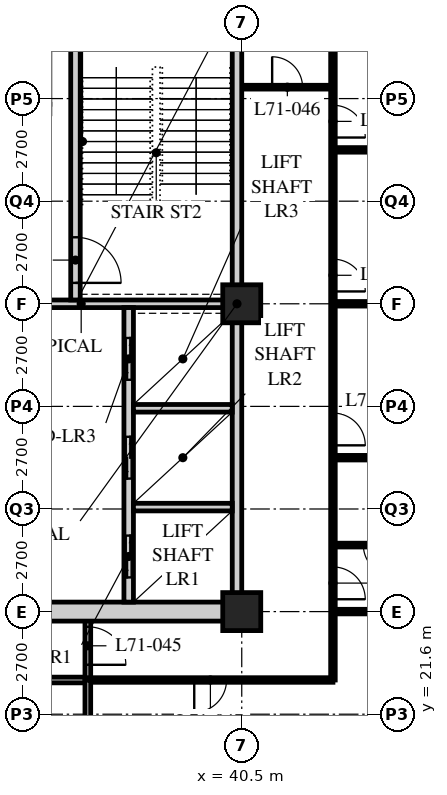
"""IFC4 building model, lengths in metres.
Left out: names, types, materials, properties, quantities, classifications, styles, units other than length and angle.
Written with IfcOpenShell. Run it as: python <this file> out.ifc"""

import sys

from ifc_helpers import new_model, si_unit, direction, frame, frame_2d, origin, origin_2d, place, context, subcontext, project, spatial, rectangle, hollow_rectangle, extrude, element, fill, save


model = new_model("IFC4")
c1 = context("Model", 3, precision=1e-05, world=origin(), true_north=direction((0.0, 1.0)))
c2 = subcontext(c1, "Body", "Model", "MODEL_VIEW")
j1 = project(units=[si_unit("LENGTHUNIT", "METRE"), si_unit("PLANEANGLEUNIT", "RADIAN")], contexts=[c1])
p1 = place(None, origin())
s1 = spatial("IfcSite", under=j1, at=p1, CompositionType="ELEMENT")
p2 = place(p1, origin())
s2 = spatial("IfcBuilding", under=s1, at=p2, CompositionType="ELEMENT")
p3 = place(p2, frame((0.0, 0.0, 277.5)))
s3 = spatial("IfcBuildingStorey", under=s2, at=p3, CompositionType="ELEMENT", Elevation=277.5)
for number, where, z_axis, x_axis in (
    (1, (40.5, 24.3, 0.0), (0.0, 0.0, 1.0), (1.0, 0.0, 0.0)),
    (2, (40.5, 32.4, 0.0), (0.0, 0.0, 1.0), (1.0, 0.0, 0.0)),
):
    element("IfcColumn", number, at=place(p3, frame(where, z_axis=z_axis, x_axis=x_axis)), inside=s3, PredefinedType="COLUMN", context=c2, shape_type="SweptSolid", body=[
        extrude(hollow_rectangle(XDim=1.0, YDim=1.0, WallThickness=0.1, at=origin_2d()), origin(), (0.0, 0.0, 1.0), 3.9),
    ])
p4 = place(p3, frame((12.15, 22.5, 0.0), z_axis=(0.0, 0.0, 1.0), x_axis=(1.0, 0.0, 0.0)))
e3 = element("IfcWall", 3, at=p4, inside=s3, PredefinedType="PARTITIONING", context=c2, shape_type="SweptSolid", body=[
    extrude(rectangle(XDim=24.3, YDim=0.15, at=frame_2d((12.15, 0.0))), origin(), (0.0, 0.0, 1.0), 3.69),
])
p5 = place(p4, frame((4.45, 0.0, 0.0)))
e4 = element("IfcOpeningElement", 4, at=p5, cuts=e3, PredefinedType="OPENING", context=c2, shape_type="SweptSolid", body=[
    extrude(rectangle(XDim=1.0, YDim=2.1, at=frame_2d((0.5, 1.05))), frame((0.0, 0.085, 0.0), z_axis=(0.0, -1.0, 0.0), x_axis=(1.0, 0.0, 0.0)), (0.0, 0.0, 1.0), 0.17),
])
p6 = place(p4, frame((12.55, 0.0, 0.0)))
e5 = element("IfcOpeningElement", 5, at=p6, cuts=e3, PredefinedType="OPENING", context=c2, shape_type="SweptSolid", body=[
    extrude(rectangle(XDim=1.0, YDim=2.1, at=frame_2d((0.5, 1.05))), frame((0.0, 0.085, 0.0), z_axis=(0.0, -1.0, 0.0), x_axis=(1.0, 0.0, 0.0)), (0.0, 0.0, 1.0), 0.17),
])
p7 = place(p4, frame((2.625, 0.0, 0.0)))
e6 = element("IfcOpeningElement", 6, at=p7, cuts=e3, PredefinedType="OPENING", context=c2, shape_type="SweptSolid", body=[
    extrude(rectangle(XDim=1.0, YDim=2.1, at=frame_2d((0.5, 1.05))), frame((0.0, 0.085, 0.0), z_axis=(0.0, -1.0, 0.0), x_axis=(1.0, 0.0, 0.0)), (0.0, 0.0, 1.0), 0.17),
])
p8 = place(p3, frame((36.45, 22.5, 0.0), z_axis=(0.0, 0.0, 1.0), x_axis=(0.0, 1.0, 0.0)))
e7 = element("IfcWall", 7, at=p8, inside=s3, PredefinedType="PARTITIONING", context=c2, shape_type="SweptSolid", body=[
    extrude(rectangle(XDim=1.8, YDim=0.15, at=frame_2d((0.9, 0.0))), origin(), (0.0, 0.0, 1.0), 3.69),
])
p9 = place(p8, frame((0.4, 0.0, 0.0)))
e8 = element("IfcOpeningElement", 8, at=p9, cuts=e7, PredefinedType="OPENING", context=c2, shape_type="SweptSolid", body=[
    extrude(rectangle(XDim=1.0, YDim=2.1, at=frame_2d((0.5, 1.05))), frame((0.0, 0.085, 0.0), z_axis=(0.0, -1.0, 0.0), x_axis=(1.0, 0.0, 0.0)), (0.0, 0.0, 1.0), 0.17),
])
p10 = place(p3, frame((40.5, 38.1, 0.0), z_axis=(0.0, 0.0, 1.0), x_axis=(1.0, 0.0, 0.0)))
e9 = element("IfcWall", 9, at=p10, inside=s3, PredefinedType="PARTITIONING", context=c2, shape_type="SweptSolid", body=[
    extrude(rectangle(XDim=2.4, YDim=0.1, at=frame_2d((1.2, 0.0))), origin(), (0.0, 0.0, 1.0), 3.69),
])
p11 = place(p10, frame((0.8, 0.0, 0.0)))
e10 = element("IfcOpeningElement", 10, at=p11, cuts=e9, PredefinedType="OPENING", context=c2, shape_type="SweptSolid", body=[
    extrude(rectangle(XDim=0.8, YDim=2.1, at=frame_2d((0.4, 1.05))), frame((0.0, 0.06, 0.0), z_axis=(0.0, -1.0, 0.0), x_axis=(1.0, 0.0, 0.0)), (0.0, 0.0, 1.0), 0.12),
])
p12 = place(p3, frame((42.9, 22.5, 0.0), z_axis=(0.0, 0.0, 1.0), x_axis=(0.0, 1.0, 0.0)))
e11 = element("IfcWall", 11, at=p12, inside=s3, PredefinedType="PARTITIONING", context=c2, shape_type="SweptSolid", body=[
    extrude(rectangle(XDim=18.0, YDim=0.12, at=frame_2d((9.0, 0.0))), origin(), (0.0, 0.0, 1.0), 3.69),
])
p13 = place(p12, frame((2.125, 0.0, 0.0)))
e12 = element("IfcOpeningElement", 12, at=p13, cuts=e11, PredefinedType="OPENING", context=c2, shape_type="SweptSolid", body=[
    extrude(rectangle(XDim=0.85, YDim=2.1, at=frame_2d((0.425, 1.05))), frame((0.0, 0.07, 0.0), z_axis=(0.0, -1.0, 0.0), x_axis=(1.0, 0.0, 0.0)), (0.0, 0.0, 1.0), 0.14),
])
p14 = place(p12, frame((6.175, 0.0, 0.0)))
e13 = element("IfcOpeningElement", 13, at=p14, cuts=e11, PredefinedType="OPENING", context=c2, shape_type="SweptSolid", body=[
    extrude(rectangle(XDim=0.85, YDim=2.1, at=frame_2d((0.425, 1.05))), frame((0.0, 0.07, 0.0), z_axis=(0.0, -1.0, 0.0), x_axis=(1.0, 0.0, 0.0)), (0.0, 0.0, 1.0), 0.14),
])
p15 = place(p12, frame((10.225, 0.0, 0.0)))
e14 = element("IfcOpeningElement", 14, at=p15, cuts=e11, PredefinedType="OPENING", context=c2, shape_type="SweptSolid", body=[
    extrude(rectangle(XDim=0.85, YDim=2.1, at=frame_2d((0.425, 1.05))), frame((0.0, 0.07, 0.0), z_axis=(0.0, -1.0, 0.0), x_axis=(1.0, 0.0, 0.0)), (0.0, 0.0, 1.0), 0.14),
])
p16 = place(p12, frame((14.275, 0.0, 0.0)))
e15 = element("IfcOpeningElement", 15, at=p16, cuts=e11, PredefinedType="OPENING", context=c2, shape_type="SweptSolid", body=[
    extrude(rectangle(XDim=0.85, YDim=2.1, at=frame_2d((0.425, 1.05))), frame((0.0, 0.07, 0.0), z_axis=(0.0, -1.0, 0.0), x_axis=(1.0, 0.0, 0.0)), (0.0, 0.0, 1.0), 0.14),
])
p17 = place(p3, frame((36.45, 22.5, 0.0), z_axis=(0.0, 0.0, 1.0), x_axis=(1.0, 0.0, 0.0)))
e16 = element("IfcWall", 16, at=p17, inside=s3, PredefinedType="PARTITIONING", context=c2, shape_type="SweptSolid", body=[
    extrude(rectangle(XDim=6.45, YDim=0.12, at=frame_2d((3.225, 0.0))), origin(), (0.0, 0.0, 1.0), 3.69),
])
p18 = place(p17, frame((2.8, 0.0, 0.0)))
e17 = element("IfcOpeningElement", 17, at=p18, cuts=e16, PredefinedType="OPENING", context=c2, shape_type="SweptSolid", body=[
    extrude(rectangle(XDim=0.85, YDim=2.1, at=frame_2d((0.425, 1.05))), frame((0.0, 0.07, 0.0), z_axis=(0.0, -1.0, 0.0), x_axis=(1.0, 0.0, 0.0)), (0.0, 0.0, 1.0), 0.14),
])
p19 = place(p3, frame((42.9, 24.3, 0.0), z_axis=(0.0, 0.0, 1.0), x_axis=(1.0, 0.0, 0.0)))
e18 = element("IfcWall", 18, at=p19, inside=s3, PredefinedType="PARTITIONING", context=c2, shape_type="SweptSolid", body=[
    extrude(rectangle(XDim=9.45, YDim=0.12, at=frame_2d((4.725, 0.0))), origin(), (0.0, 0.0, 1.0), 3.078),
])
p20 = place(p3, frame((36.45, 16.5, 0.0), z_axis=(0.0, 0.0, 1.0), x_axis=(0.0, 1.0, 0.0)))
e19 = element("IfcWall", 19, at=p20, inside=s3, PredefinedType="PARTITIONING", context=c2, shape_type="SweptSolid", body=[
    extrude(rectangle(XDim=6.0, YDim=0.15, at=frame_2d((3.0, 0.0))), origin(), (0.0, 0.0, 1.0), 3.69),
])
p21 = place(p3, frame((42.9, 26.05, 0.0), z_axis=(0.0, 0.0, 1.0), x_axis=(1.0, 0.0, 0.0)))
e20 = element("IfcWall", 20, at=p21, inside=s3, PredefinedType="PARTITIONING", context=c2, shape_type="SweptSolid", body=[
    extrude(rectangle(XDim=2.4, YDim=0.1, at=frame_2d((1.2, 0.0))), origin(), (0.0, 0.0, 1.0), 3.69),
])
p22 = place(p21, frame((0.8, 0.0, 0.0)))
e21 = element("IfcOpeningElement", 21, at=p22, cuts=e20, PredefinedType="OPENING", context=c2, shape_type="SweptSolid", body=[
    extrude(rectangle(XDim=0.8, YDim=2.1, at=frame_2d((0.4, 1.05))), frame((0.0, 0.06, 0.0), z_axis=(0.0, -1.0, 0.0), x_axis=(1.0, 0.0, 0.0)), (0.0, 0.0, 1.0), 0.12),
])
p23 = place(p3, frame((42.9, 28.35, 0.0), z_axis=(0.0, 0.0, 1.0), x_axis=(1.0, 0.0, 0.0)))
e22 = element("IfcWall", 22, at=p23, inside=s3, PredefinedType="PARTITIONING", context=c2, shape_type="SweptSolid", body=[
    extrude(rectangle(XDim=13.5, YDim=0.12, at=frame_2d((6.75, 0.0))), origin(), (0.0, 0.0, 1.0), 3.69),
])
p24 = place(p3, frame((42.9, 32.4, 0.0), z_axis=(0.0, 0.0, 1.0), x_axis=(1.0, 0.0, 0.0)))
e23 = element("IfcWall", 23, at=p24, inside=s3, PredefinedType="PARTITIONING", context=c2, shape_type="SweptSolid", body=[
    extrude(rectangle(XDim=13.5, YDim=0.12, at=frame_2d((6.75, 0.0))), origin(), (0.0, 0.0, 1.0), 3.078),
])
p25 = place(p3, frame((42.9, 36.45, 0.0), z_axis=(0.0, 0.0, 1.0), x_axis=(1.0, 0.0, 0.0)))
e24 = element("IfcWall", 24, at=p25, inside=s3, PredefinedType="PARTITIONING", context=c2, shape_type="SweptSolid", body=[
    extrude(rectangle(XDim=13.5, YDim=0.12, at=frame_2d((6.75, 0.0))), origin(), (0.0, 0.0, 1.0), 3.69),
])
p26 = place(p3, frame((15.95, 24.3, 0.0), z_axis=(0.0, 0.0, 1.0), x_axis=(1.0, 0.0, 0.0)))
e25 = element("IfcWall", 25, at=p26, inside=s3, PredefinedType="SOLIDWALL", context=c2, shape_type="SweptSolid", body=[
    extrude(rectangle(XDim=24.55, YDim=0.5, at=frame_2d((12.275, 0.0))), origin(), (0.0, 0.0, 1.0), 3.04),
])
p27 = place(p26, frame((11.5, 0.0, 0.0)))
e26 = element("IfcOpeningElement", 26, at=p27, cuts=e25, PredefinedType="OPENING", context=c2, shape_type="SweptSolid", body=[
    extrude(rectangle(XDim=1.8, YDim=2.4, at=frame_2d((0.9, 1.2))), frame((0.0, 0.26, 0.0), z_axis=(0.0, -1.0, 0.0), x_axis=(1.0, 0.0, 0.0)), (0.0, 0.0, 1.0), 0.52),
])
p28 = place(p3, frame((40.375, 24.55, 0.0), z_axis=(0.0, 0.0, 1.0), x_axis=(0.0, 1.0, 0.0)))
e27 = element("IfcWall", 27, at=p28, inside=s3, PredefinedType="SOLIDWALL", context=c2, shape_type="SweptSolid", body=[
    extrude(rectangle(XDim=15.7, YDim=0.25, at=frame_2d((7.85, 0.0))), origin(), (0.0, 0.0, 1.0), 3.078),
])
p29 = place(p3, frame((32.3, 32.4, 0.0), z_axis=(0.0, 0.0, 1.0), x_axis=(1.0, 0.0, 0.0)))
e28 = element("IfcWall", 28, at=p29, inside=s3, PredefinedType="SOLIDWALL", context=c2, shape_type="SweptSolid", body=[
    extrude(rectangle(XDim=7.95, YDim=0.2, at=frame_2d((3.975, 0.0))), origin(), (0.0, 0.0, 1.0), 3.078),
])
p30 = place(p3, frame((37.525, 24.55, 0.0), z_axis=(0.0, 0.0, 1.0), x_axis=(0.0, 1.0, 0.0)))
e29 = element("IfcWall", 29, at=p30, inside=s3, PredefinedType="SOLIDWALL", context=c2, shape_type="SweptSolid", body=[
    extrude(rectangle(XDim=7.75, YDim=0.25, at=frame_2d((3.875, 0.0))), origin(), (0.0, 0.0, 1.0), 3.69),
])
p31 = place(p30, frame((0.65, 0.0, 0.0)))
e30 = element("IfcOpeningElement", 30, at=p31, cuts=e29, PredefinedType="OPENING", context=c2, shape_type="SweptSolid", body=[
    extrude(rectangle(XDim=1.1, YDim=2.4, at=frame_2d((0.55, 1.2))), frame((0.0, 0.135, 0.0), z_axis=(0.0, -1.0, 0.0), x_axis=(1.0, 0.0, 0.0)), (0.0, 0.0, 1.0), 0.27),
])
p32 = place(p30, frame((3.25, 0.0, 0.0)))
e31 = element("IfcOpeningElement", 31, at=p32, cuts=e29, PredefinedType="OPENING", context=c2, shape_type="SweptSolid", body=[
    extrude(rectangle(XDim=1.1, YDim=2.4, at=frame_2d((0.55, 1.2))), frame((0.0, 0.135, 0.0), z_axis=(0.0, -1.0, 0.0), x_axis=(1.0, 0.0, 0.0)), (0.0, 0.0, 1.0), 0.27),
])
p33 = place(p30, frame((5.85, 0.0, 0.0)))
e32 = element("IfcOpeningElement", 32, at=p33, cuts=e29, PredefinedType="OPENING", context=c2, shape_type="SweptSolid", body=[
    extrude(rectangle(XDim=1.1, YDim=2.4, at=frame_2d((0.55, 1.2))), frame((0.0, 0.135, 0.0), z_axis=(0.0, -1.0, 0.0), x_axis=(1.0, 0.0, 0.0)), (0.0, 0.0, 1.0), 0.27),
])
for number, where, z_axis, x_axis in (
    (33, (37.65, 27.05, 0.0), (0.0, 0.0, 1.0), (1.0, 0.0, 0.0)),
    (34, (37.65, 29.65, 0.0), (0.0, 0.0, 1.0), (1.0, 0.0, 0.0)),
):
    element("IfcWall", number, at=place(p3, frame(where, z_axis=z_axis, x_axis=x_axis)), inside=s3, PredefinedType="SOLIDWALL", context=c2, shape_type="SweptSolid", body=[
        extrude(rectangle(XDim=2.6, YDim=0.2, at=frame_2d((1.3, 0.0))), origin(), (0.0, 0.0, 1.0), 3.69),
    ])
p34 = place(p3, frame((36.125, 32.5, 0.0), z_axis=(0.0, 0.0, 1.0), x_axis=(0.0, 1.0, 0.0)))
e35 = element("IfcWall", 35, at=p34, inside=s3, PredefinedType="SOLIDWALL", context=c2, shape_type="SweptSolid", body=[
    extrude(rectangle(XDim=7.75, YDim=0.25, at=frame_2d((3.875, 0.0))), origin(), (0.0, 0.0, 1.0), 3.69),
])
p35 = place(p34, frame((0.45, 0.0, 0.0)))
e36 = element("IfcOpeningElement", 36, at=p35, cuts=e35, PredefinedType="OPENING", context=c2, shape_type="SweptSolid", body=[
    extrude(rectangle(XDim=1.2, YDim=2.1, at=frame_2d((0.6, 1.05))), frame((0.0, 0.135, 0.0), z_axis=(0.0, -1.0, 0.0), x_axis=(1.0, 0.0, 0.0)), (0.0, 0.0, 1.0), 0.27),
])
p36 = place(p9, origin())
e37 = element("IfcDoor", 37, at=p36, inside=s3, OperationType="SINGLE_SWING_RIGHT", PredefinedType="DOOR", context=c2, shape_type="SweptSolid", body=[
    extrude(rectangle(XDim=1.0, YDim=2.1, at=frame_2d((0.5, 1.05))), frame((0.0, 0.025, 0.0), z_axis=(0.0, -1.0, 0.0), x_axis=(1.0, 0.0, 0.0)), (0.0, 0.0, 1.0), 0.05),
])
fill(e8, e37)
p37 = place(p11, origin())
e38 = element("IfcDoor", 38, at=p37, inside=s3, OperationType="SINGLE_SWING_LEFT", PredefinedType="DOOR", context=c2, shape_type="SweptSolid", body=[
    extrude(rectangle(XDim=0.8, YDim=2.1, at=frame_2d((0.4, 1.05))), frame((0.0, 0.025, 0.0), z_axis=(0.0, -1.0, 0.0), x_axis=(1.0, 0.0, 0.0)), (0.0, 0.0, 1.0), 0.05),
])
fill(e10, e38)
p38 = place(p18, origin())
e39 = element("IfcDoor", 39, at=p38, inside=s3, OperationType="SINGLE_SWING_RIGHT", PredefinedType="DOOR", context=c2, shape_type="SweptSolid", body=[
    extrude(rectangle(XDim=0.85, YDim=2.1, at=frame_2d((0.425, 1.05))), frame((0.0, 0.025, 0.0), z_axis=(0.0, -1.0, 0.0), x_axis=(1.0, 0.0, 0.0)), (0.0, 0.0, 1.0), 0.05),
])
fill(e17, e39)
p39 = place(p22, origin())
e40 = element("IfcDoor", 40, at=p39, inside=s3, OperationType="SINGLE_SWING_LEFT", PredefinedType="DOOR", context=c2, shape_type="SweptSolid", body=[
    extrude(rectangle(XDim=0.8, YDim=2.1, at=frame_2d((0.4, 1.05))), frame((0.0, 0.025, 0.0), z_axis=(0.0, -1.0, 0.0), x_axis=(1.0, 0.0, 0.0)), (0.0, 0.0, 1.0), 0.05),
])
fill(e21, e40)
p40 = place(p13, origin())
e41 = element("IfcDoor", 41, at=p40, inside=s3, OperationType="SINGLE_SWING_RIGHT", PredefinedType="DOOR", context=c2, shape_type="SweptSolid", body=[
    extrude(rectangle(XDim=0.85, YDim=2.1, at=frame_2d((0.425, 1.05))), frame((0.0, 0.025, 0.0), z_axis=(0.0, -1.0, 0.0), x_axis=(1.0, 0.0, 0.0)), (0.0, 0.0, 1.0), 0.05),
])
fill(e12, e41)
p41 = place(p14, origin())
e42 = element("IfcDoor", 42, at=p41, inside=s3, OperationType="SINGLE_SWING_RIGHT", PredefinedType="DOOR", context=c2, shape_type="SweptSolid", body=[
    extrude(rectangle(XDim=0.85, YDim=2.1, at=frame_2d((0.425, 1.05))), frame((0.0, 0.025, 0.0), z_axis=(0.0, -1.0, 0.0), x_axis=(1.0, 0.0, 0.0)), (0.0, 0.0, 1.0), 0.05),
])
fill(e13, e42)
p42 = place(p15, origin())
e43 = element("IfcDoor", 43, at=p42, inside=s3, OperationType="SINGLE_SWING_RIGHT", PredefinedType="DOOR", context=c2, shape_type="SweptSolid", body=[
    extrude(rectangle(XDim=0.85, YDim=2.1, at=frame_2d((0.425, 1.05))), frame((0.0, 0.025, 0.0), z_axis=(0.0, -1.0, 0.0), x_axis=(1.0, 0.0, 0.0)), (0.0, 0.0, 1.0), 0.05),
])
fill(e14, e43)
p43 = place(p16, origin())
e44 = element("IfcDoor", 44, at=p43, inside=s3, OperationType="SINGLE_SWING_RIGHT", PredefinedType="DOOR", context=c2, shape_type="SweptSolid", body=[
    extrude(rectangle(XDim=0.85, YDim=2.1, at=frame_2d((0.425, 1.05))), frame((0.0, 0.025, 0.0), z_axis=(0.0, -1.0, 0.0), x_axis=(1.0, 0.0, 0.0)), (0.0, 0.0, 1.0), 0.05),
])
fill(e15, e44)
p44 = place(p35, origin())
e45 = element("IfcDoor", 45, at=p44, inside=s3, OperationType="SINGLE_SWING_RIGHT", PredefinedType="DOOR", context=c2, shape_type="SweptSolid", body=[
    extrude(rectangle(XDim=1.2, YDim=2.1, at=frame_2d((0.6, 1.05))), frame((0.0, 0.025, 0.0), z_axis=(0.0, -1.0, 0.0), x_axis=(1.0, 0.0, 0.0)), (0.0, 0.0, 1.0), 0.05),
])
fill(e36, e45)
p45 = place(p31, origin())
e46 = element("IfcDoor", 46, at=p45, inside=s3, OperationType="DOUBLE_DOOR_SLIDING", PredefinedType="DOOR", context=c2, shape_type="SweptSolid", body=[
    extrude(rectangle(XDim=1.1, YDim=2.4, at=frame_2d((0.55, 1.2))), frame((0.0, 0.025, 0.0), z_axis=(0.0, -1.0, 0.0), x_axis=(1.0, 0.0, 0.0)), (0.0, 0.0, 1.0), 0.05),
])
fill(e30, e46)
p46 = place(p32, origin())
e47 = element("IfcDoor", 47, at=p46, inside=s3, OperationType="DOUBLE_DOOR_SLIDING", PredefinedType="DOOR", context=c2, shape_type="SweptSolid", body=[
    extrude(rectangle(XDim=1.1, YDim=2.4, at=frame_2d((0.55, 1.2))), frame((0.0, 0.025, 0.0), z_axis=(0.0, -1.0, 0.0), x_axis=(1.0, 0.0, 0.0)), (0.0, 0.0, 1.0), 0.05),
])
fill(e31, e47)
p47 = place(p33, origin())
e48 = element("IfcDoor", 48, at=p47, inside=s3, OperationType="DOUBLE_DOOR_SLIDING", PredefinedType="DOOR", context=c2, shape_type="SweptSolid", body=[
    extrude(rectangle(XDim=1.1, YDim=2.4, at=frame_2d((0.55, 1.2))), frame((0.0, 0.025, 0.0), z_axis=(0.0, -1.0, 0.0), x_axis=(1.0, 0.0, 0.0)), (0.0, 0.0, 1.0), 0.05),
])
fill(e32, e48)
save(model, sys.argv[1])
